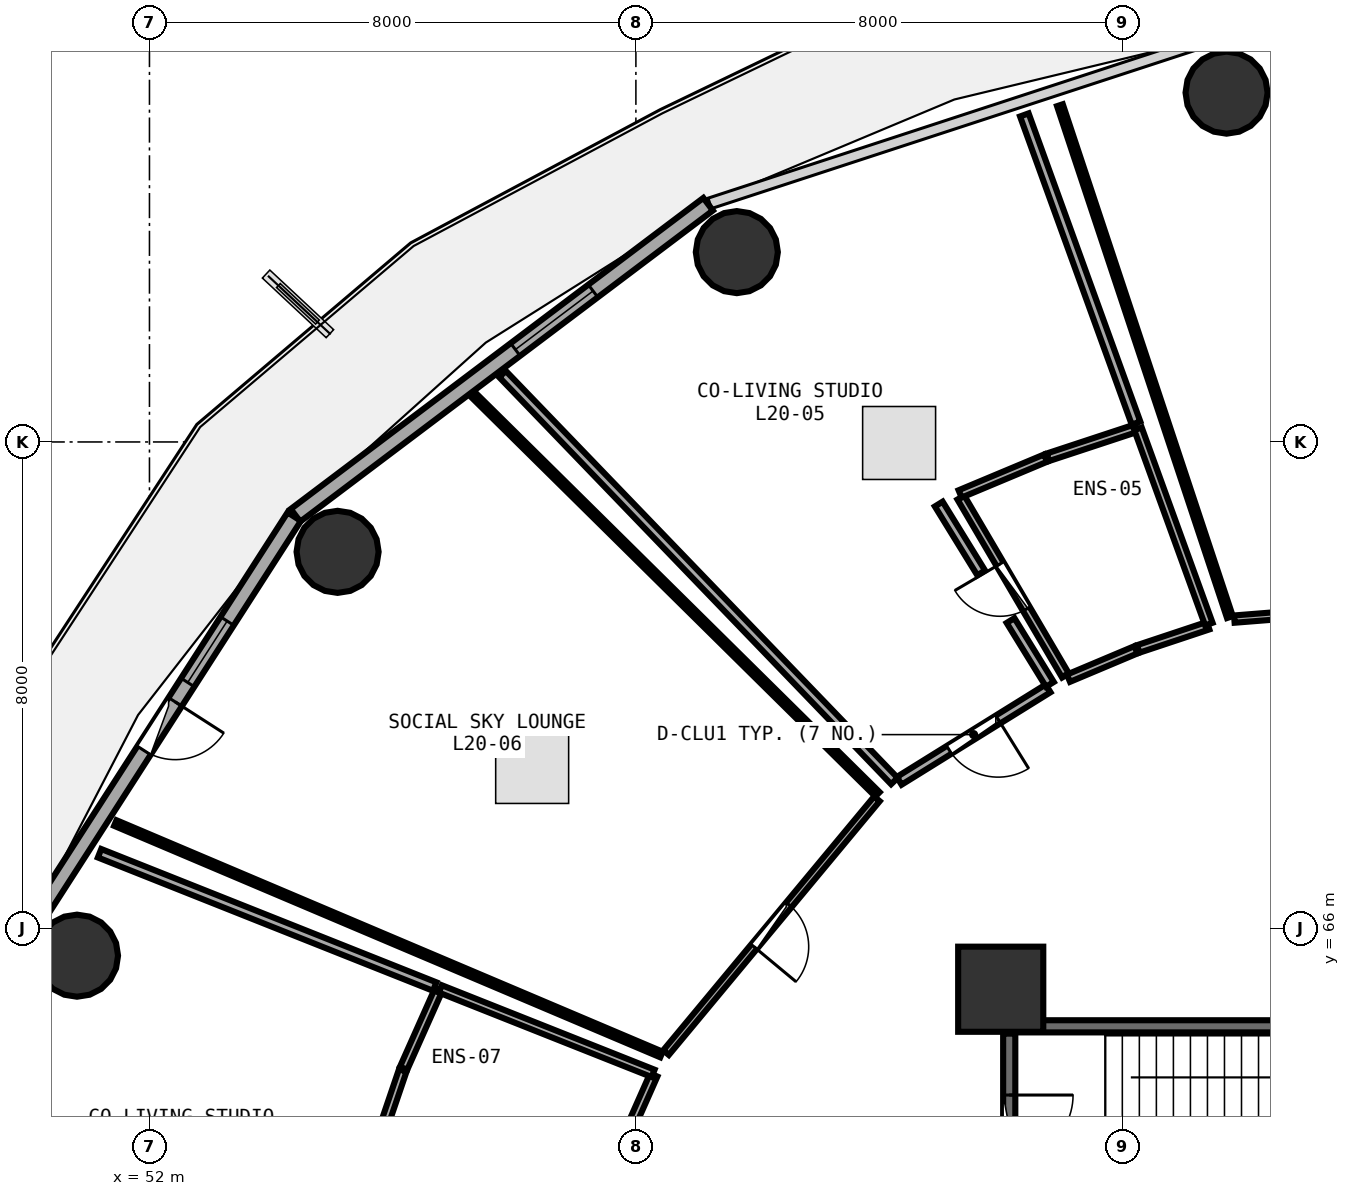
"""IFC4 building model, lengths in metres.
Left out: names, types, materials, properties, quantities, classifications, styles, units other than length and angle.
Written with IfcOpenShell. Run it as: python <this file> out.ifc"""

import sys

from ifc_helpers import new_model, si_unit, direction, frame, frame_2d, origin, origin_2d, place, context, subcontext, project, spatial, rectangle, circle, extrude, element, fill, save


model = new_model("IFC4")
c1 = context("Model", 3, precision=1e-05, world=origin(), true_north=direction((0.0, 1.0)))
c2 = subcontext(c1, "Body", "Model", "MODEL_VIEW")
j1 = project(units=[si_unit("LENGTHUNIT", "METRE"), si_unit("PLANEANGLEUNIT", "RADIAN")], contexts=[c1])
p1 = place(None, origin())
s1 = spatial("IfcSite", under=j1, at=p1, CompositionType="ELEMENT")
p2 = place(p1, origin())
s2 = spatial("IfcBuilding", under=s1, at=p2, CompositionType="ELEMENT")
p3 = place(p2, frame((0.0, 0.0, 80.1)))
s3 = spatial("IfcBuildingStorey", under=s2, at=p3, CompositionType="ELEMENT", Elevation=80.1)
p4 = place(p3, frame((66.0, 65.0, 0.0), z_axis=(0.0, 0.0, 1.0), x_axis=(1.0, 0.0, 0.0)))
e1 = element("IfcColumn", 1, at=p4, inside=s3, PredefinedType="PILASTER", context=c2, shape_type="SweptSolid", body=[
    extrude(rectangle(XDim=1.4, YDim=1.4, at=origin_2d()), origin(), (0.0, 0.0, 1.0), 3.75),
])
for number, where, z_axis, x_axis in (
    (2, (69.714, 79.745, 0.0), (0.0, 0.0, 1.0), (1.0, 0.0, 0.0)),
    (3, (61.66, 77.122, 0.0), (0.0, 0.0, 1.0), (1.0, 0.0, 0.0)),
    (4, (55.094, 72.193, 0.0), (0.0, 0.0, 1.0), (1.0, 0.0, 0.0)),
    (5, (50.808, 65.552, 0.0), (0.0, 0.0, 1.0), (1.0, 0.0, 0.0)),
):
    element("IfcColumn", number, at=place(p3, frame(where, z_axis=z_axis, x_axis=x_axis)), inside=s3, PredefinedType="COLUMN", context=c2, shape_type="SweptSolid", body=[
        extrude(circle(Radius=0.675, at=origin_2d()), origin(), (0.0, 0.0, 1.0), 3.75),
    ])
p5 = place(p3, frame((61.188, 77.91, 0.0), z_axis=(0.0, 0.0, 1.0), x_axis=(-0.798501507879, -0.601992808857, 0.0)))
e6 = element("IfcWall", 6, at=p5, inside=s3, PredefinedType="SOLIDWALL", context=c2, shape_type="SweptSolid", body=[
    extrude(rectangle(XDim=8.499, YDim=0.26, at=frame_2d((4.25, 0.0))), origin(), (0.0, 0.0, 1.0), 3.475),
])
p6 = place(p5, frame((2.37, 0.0, 0.85)))
e7 = element("IfcOpeningElement", 7, at=p6, cuts=e6, PredefinedType="OPENING", context=c2, shape_type="SweptSolid", body=[
    extrude(rectangle(XDim=1.6, YDim=1.45, at=frame_2d((0.8, 0.725))), frame((0.0, 0.14, 0.0), z_axis=(0.0, -1.0, 0.0), x_axis=(1.0, 0.0, 0.0)), (0.0, 0.0, 1.0), 0.28),
])
p7 = place(p3, frame((54.381, 72.771, 0.0), z_axis=(0.0, 0.0, 1.0), x_axis=(-0.540620528459, -0.841266571432, 0.0)))
e8 = element("IfcWall", 8, at=p7, inside=s3, PredefinedType="SOLIDWALL", context=c2, shape_type="SweptSolid", body=[
    extrude(rectangle(XDim=8.193, YDim=0.26, at=frame_2d((4.096, 0.0))), origin(), (0.0, 0.0, 1.0), 3.475),
])
p8 = place(p7, frame((3.621, 0.0, 0.0)))
e9 = element("IfcOpeningElement", 9, at=p8, cuts=e8, PredefinedType="OPENING", context=c2, shape_type="SweptSolid", body=[
    extrude(rectangle(XDim=0.95, YDim=2.1, at=frame_2d((0.475, 1.05))), frame((0.0, 0.14, 0.0), z_axis=(0.0, -1.0, 0.0), x_axis=(1.0, 0.0, 0.0)), (0.0, 0.0, 1.0), 0.28),
])
p9 = place(p7, frame((2.041, 0.0, 0.85)))
e10 = element("IfcOpeningElement", 10, at=p9, cuts=e8, PredefinedType="OPENING", context=c2, shape_type="SweptSolid", body=[
    extrude(rectangle(XDim=1.2, YDim=1.45, at=frame_2d((0.6, 0.725))), frame((0.0, 0.14, 0.0), z_axis=(0.0, -1.0, 0.0), x_axis=(1.0, 0.0, 0.0)), (0.0, 0.0, 1.0), 0.28),
])
p10 = place(p3, frame((73.42, 64.39, 0.0), z_axis=(0.0, 0.0, 1.0), x_axis=(-1.0, 0.0, 0.0)))
e11 = element("IfcWall", 11, at=p10, inside=s3, PredefinedType="SHEAR", context=c2, shape_type="SweptSolid", body=[
    extrude(rectangle(XDim=7.16, YDim=0.2, at=frame_2d((3.58, 0.0))), origin(), (0.0, 0.0, 1.0), 3.49),
])
p11 = place(p3, frame((66.14, 64.27, 0.0), z_axis=(0.0, 0.0, 1.0), x_axis=(0.0, -1.0, 0.0)))
e12 = element("IfcWall", 12, at=p11, inside=s3, PredefinedType="SHEAR", context=c2, shape_type="SweptSolid", body=[
    extrude(rectangle(XDim=3.07, YDim=0.2, at=frame_2d((1.535, 0.0))), origin(), (0.0, 0.0, 1.0), 3.49),
])
p12 = place(p11, frame((1.01, 0.0, 0.0)))
e13 = element("IfcOpeningElement", 13, at=p12, cuts=e12, PredefinedType="OPENING", context=c2, shape_type="SweptSolid", body=[
    extrude(rectangle(XDim=1.05, YDim=2.1, at=frame_2d((0.525, 1.05))), frame((0.0, 0.11, 0.0), z_axis=(0.0, -1.0, 0.0), x_axis=(1.0, 0.0, 0.0)), (0.0, 0.0, 1.0), 0.22),
])
p13 = place(p3, frame((75.589, 71.543, 0.0), z_axis=(0.0, 0.0, 1.0), x_axis=(-0.996863165686, -0.079144354814, 0.0)))
e14 = element("IfcWall", 14, at=p13, inside=s3, PredefinedType="PARTITIONING", context=c2, shape_type="SweptSolid", body=[
    extrude(rectangle(XDim=5.765, YDim=0.12, at=frame_2d((2.883, 0.0))), origin(), (0.0, 0.0, 1.0), 2.925),
])
p14 = place(p13, frame((2.433, 0.0, 0.0)))
e15 = element("IfcOpeningElement", 15, at=p14, cuts=e14, PredefinedType="OPENING", context=c2, shape_type="SweptSolid", body=[
    extrude(rectangle(XDim=0.9, YDim=2.08, at=frame_2d((0.45, 1.04))), frame((0.0, 0.07, 0.0), z_axis=(0.0, -1.0, 0.0), x_axis=(1.0, 0.0, 0.0)), (0.0, 0.0, 1.0), 0.14),
])
p15 = place(p3, frame((67.066, 70.159, 0.0), z_axis=(0.0, 0.0, 1.0), x_axis=(-0.506831608452, 0.862045080419, 0.0)))
e16 = element("IfcWall", 16, at=p15, inside=s3, PredefinedType="PLUMBINGWALL", context=c2, shape_type="SweptSolid", body=[
    extrude(rectangle(XDim=3.396, YDim=0.13, at=frame_2d((1.698, 0.0))), origin(), (0.0, 0.0, 1.0), 3.175),
])
p16 = place(p15, frame((1.268, 0.0, 0.0)))
e17 = element("IfcOpeningElement", 17, at=p16, cuts=e16, PredefinedType="OPENING", context=c2, shape_type="SweptSolid", body=[
    extrude(rectangle(XDim=0.86, YDim=2.05, at=frame_2d((0.43, 1.025))), frame((0.0, 0.075, 0.0), z_axis=(0.0, -1.0, 0.0), x_axis=(1.0, 0.0, 0.0)), (0.0, 0.0, 1.0), 0.15),
])
p17 = place(p3, frame((66.779, 69.947, 0.0), z_axis=(0.0, 0.0, 1.0), x_axis=(-0.849569495091, -0.527476703761, 0.0)))
e18 = element("IfcWall", 18, at=p17, inside=s3, PredefinedType="PARTITIONING", context=c2, shape_type="SweptSolid", body=[
    extrude(rectangle(XDim=2.883, YDim=0.15, at=frame_2d((1.441, 0.0))), origin(), (0.0, 0.0, 1.0), 2.925),
])
p18 = place(p17, frame((0.966, 0.0, 0.0)))
e19 = element("IfcOpeningElement", 19, at=p18, cuts=e18, PredefinedType="OPENING", context=c2, shape_type="SweptSolid", body=[
    extrude(rectangle(XDim=0.95, YDim=2.08, at=frame_2d((0.475, 1.04))), frame((0.0, 0.085, 0.0), z_axis=(0.0, -1.0, 0.0), x_axis=(1.0, 0.0, 0.0)), (0.0, 0.0, 1.0), 0.17),
])
p19 = place(p3, frame((63.964, 68.131, 0.0), z_axis=(0.0, 0.0, 1.0), x_axis=(-0.639104047727, -0.769120287198, 0.0)))
e20 = element("IfcWall", 20, at=p19, inside=s3, PredefinedType="PARTITIONING", context=c2, shape_type="SweptSolid", body=[
    extrude(rectangle(XDim=5.427, YDim=0.12, at=frame_2d((2.713, 0.0))), origin(), (0.0, 0.0, 1.0), 2.925),
])
p20 = place(p19, frame((2.263, 0.0, 0.0)))
e21 = element("IfcOpeningElement", 21, at=p20, cuts=e20, PredefinedType="OPENING", context=c2, shape_type="SweptSolid", body=[
    extrude(rectangle(XDim=0.9, YDim=2.08, at=frame_2d((0.45, 1.04))), frame((0.0, 0.07, 0.0), z_axis=(0.0, -1.0, 0.0), x_axis=(1.0, 0.0, 0.0)), (0.0, 0.0, 1.0), 0.14),
])
p21 = place(p3, frame((69.769, 71.12, 0.0), z_axis=(0.0, 0.0, 1.0), x_axis=(-0.315178903164, 0.949032275005, 0.0)))
e22 = element("IfcWall", 22, at=p21, inside=s3, PredefinedType="PARTITIONING", context=c2, shape_type="SweptSolid", body=[
    extrude(rectangle(XDim=8.87, YDim=0.1, at=frame_2d((4.435, 0.0))), origin(), (0.0, 0.0, 1.0), 2.975),
])
p22 = place(p3, frame((69.411, 70.979, 0.0), z_axis=(0.0, 0.0, 1.0), x_axis=(-0.948784055635, -0.315925332592, 0.0)))
e23 = element("IfcWall", 23, at=p22, inside=s3, PredefinedType="PLUMBINGWALL", context=c2, shape_type="SweptSolid", body=[
    extrude(rectangle(XDim=1.211, YDim=0.13, at=frame_2d((0.605, 0.0))), origin(), (0.0, 0.0, 1.0), 3.48),
])
p23 = place(p3, frame((68.225, 70.582, 0.0), z_axis=(0.0, 0.0, 1.0), x_axis=(-0.921601034592, -0.388138548767, 0.0)))
e24 = element("IfcWall", 24, at=p23, inside=s3, PredefinedType="PLUMBINGWALL", context=c2, shape_type="SweptSolid", body=[
    extrude(rectangle(XDim=1.205, YDim=0.13, at=frame_2d((0.602, 0.0))), origin(), (0.0, 0.0, 1.0), 3.235),
])
p24 = place(p3, frame((65.333, 73.146, 0.0), z_axis=(0.0, 0.0, 1.0), x_axis=(0.922426393113, 0.38617295256, 0.0)))
e25 = element("IfcWall", 25, at=p24, inside=s3, PredefinedType="PLUMBINGWALL", context=c2, shape_type="SweptSolid", body=[
    extrude(rectangle(XDim=1.524, YDim=0.13, at=frame_2d((0.762, 0.0))), origin(), (0.0, 0.0, 1.0), 3.48),
])
p25 = place(p3, frame((66.776, 73.748, 0.0), z_axis=(0.0, 0.0, 1.0), x_axis=(0.949634335139, 0.313360223265, 0.0)))
e26 = element("IfcWall", 26, at=p25, inside=s3, PredefinedType="PLUMBINGWALL", context=c2, shape_type="SweptSolid", body=[
    extrude(rectangle(XDim=1.533, YDim=0.13, at=frame_2d((0.767, 0.0))), origin(), (0.0, 0.0, 1.0), 3.48),
])
p26 = place(p3, frame((68.258, 74.216, 0.0), z_axis=(0.0, 0.0, 1.0), x_axis=(0.341002962554, -0.940062221095, 0.0)))
e27 = element("IfcWall", 27, at=p26, inside=s3, PredefinedType="PLUMBINGWALL", context=c2, shape_type="SweptSolid", body=[
    extrude(rectangle(XDim=3.417, YDim=0.13, at=frame_2d((1.708, 0.0))), origin(), (0.0, 0.0, 1.0), 3.175),
])
p27 = place(p3, frame((64.251, 68.424, 0.0), z_axis=(0.0, 0.0, 1.0), x_axis=(-0.693645221886, 0.720316809574, 0.0)))
e28 = element("IfcWall", 28, at=p27, inside=s3, PredefinedType="PARTITIONING", context=c2, shape_type="SweptSolid", body=[
    extrude(rectangle(XDim=9.291, YDim=0.15, at=frame_2d((4.646, 0.0))), origin(), (0.0, 0.0, 1.0), 2.975),
])
p28 = place(p3, frame((66.389, 79.378, 0.0), z_axis=(0.0, 0.0, 1.0), x_axis=(0.340728267281, -0.940161820048, 0.0)))
e29 = element("IfcWall", 29, at=p28, inside=s3, PredefinedType="PARTITIONING", context=c2, shape_type="SweptSolid", body=[
    extrude(rectangle(XDim=5.39, YDim=0.15, at=frame_2d((2.695, 0.0))), origin(), (0.0, 0.0, 1.0), 2.975),
])
p29 = place(p3, frame((64.981, 72.979, 0.0), z_axis=(0.0, 0.0, 1.0), x_axis=(0.524609403226, -0.851343041345, 0.0)))
e30 = element("IfcWall", 30, at=p29, inside=s3, PredefinedType="PARTITIONING", context=c2, shape_type="SweptSolid", body=[
    extrude(rectangle(XDim=1.33, YDim=0.15, at=frame_2d((0.665, 0.0))), origin(), (0.0, 0.0, 1.0), 3.175),
])
p30 = place(p3, frame((66.162, 71.063, 0.0), z_axis=(0.0, 0.0, 1.0), x_axis=(0.52475967521, -0.851250423362, 0.0)))
e31 = element("IfcWall", 31, at=p30, inside=s3, PredefinedType="PARTITIONING", context=c2, shape_type="SweptSolid", body=[
    extrude(rectangle(XDim=1.234, YDim=0.15, at=frame_2d((0.617, 0.0))), origin(), (0.0, 0.0, 1.0), 3.235),
])
p31 = place(p3, frame((60.42, 63.927, 0.0), z_axis=(0.0, 0.0, 1.0), x_axis=(-0.920723225206, 0.390216276654, 0.0)))
e32 = element("IfcWall", 32, at=p31, inside=s3, PredefinedType="PARTITIONING", context=c2, shape_type="SweptSolid", body=[
    extrude(rectangle(XDim=9.756, YDim=0.1, at=frame_2d((4.878, 0.0))), origin(), (0.0, 0.0, 1.0), 2.925),
])
p32 = place(p3, frame((57.344, 74.756, 0.0), z_axis=(0.0, 0.0, 1.0), x_axis=(0.711285789258, -0.702902927864, 0.0)))
e33 = element("IfcWall", 33, at=p32, inside=s3, PredefinedType="PARTITIONING", context=c2, shape_type="SweptSolid", body=[
    extrude(rectangle(XDim=9.32, YDim=0.1, at=frame_2d((4.66, 0.0))), origin(), (0.0, 0.0, 1.0), 2.975),
])
p33 = place(p3, frame((60.294, 63.591, 0.0), z_axis=(0.0, 0.0, 1.0), x_axis=(-0.40547338745, -0.914106849372, 0.0)))
e34 = element("IfcWall", 34, at=p33, inside=s3, PredefinedType="PLUMBINGWALL", context=c2, shape_type="SweptSolid", body=[
    extrude(rectangle(XDim=1.124, YDim=0.13, at=frame_2d((0.562, 0.0))), origin(), (0.0, 0.0, 1.0), 3.235),
])
p34 = place(p3, frame((55.711, 62.331, 0.0), z_axis=(0.0, 0.0, 1.0), x_axis=(0.322409215332, 0.946600389747, 0.0)))
e35 = element("IfcWall", 35, at=p34, inside=s3, PredefinedType="PLUMBINGWALL", context=c2, shape_type="SweptSolid", body=[
    extrude(rectangle(XDim=1.408, YDim=0.13, at=frame_2d((0.704, 0.0))), origin(), (0.0, 0.0, 1.0), 3.48),
])
p35 = place(p3, frame((56.18, 63.701, 0.0), z_axis=(0.0, 0.0, 1.0), x_axis=(0.407258007738, 0.913313152831, 0.0)))
e36 = element("IfcWall", 36, at=p35, inside=s3, PredefinedType="PLUMBINGWALL", context=c2, shape_type="SweptSolid", body=[
    extrude(rectangle(XDim=1.416, YDim=0.13, at=frame_2d((0.708, 0.0))), origin(), (0.0, 0.0, 1.0), 3.175),
])
p36 = place(p3, frame((56.784, 65.006, 0.0), z_axis=(0.0, 0.0, 1.0), x_axis=(0.929457187308, -0.368929989242, 0.0)))
e37 = element("IfcWall", 37, at=p36, inside=s3, PredefinedType="PLUMBINGWALL", context=c2, shape_type="SweptSolid", body=[
    extrude(rectangle(XDim=3.765, YDim=0.13, at=frame_2d((1.883, 0.0))), origin(), (0.0, 0.0, 1.0), 3.175),
])
p37 = place(p3, frame((51.179, 67.236, 0.0), z_axis=(0.0, 0.0, 1.0), x_axis=(0.929212756669, -0.369545197294, 0.0)))
e38 = element("IfcWall", 38, at=p37, inside=s3, PredefinedType="PARTITIONING", context=c2, shape_type="SweptSolid", body=[
    extrude(rectangle(XDim=5.933, YDim=0.15, at=frame_2d((2.966, 0.0))), origin(), (0.0, 0.0, 1.0), 2.925),
])
p38 = place(p6, origin())
e39 = element("IfcWindow", 39, at=p38, inside=s3, PartitioningType="SINGLE_PANEL", PredefinedType="WINDOW", context=c2, shape_type="SweptSolid", body=[
    extrude(rectangle(XDim=1.6, YDim=1.45, at=frame_2d((0.8, 0.725))), frame((0.0, 0.03, 0.0), z_axis=(0.0, -1.0, 0.0), x_axis=(1.0, 0.0, 0.0)), (0.0, 0.0, 1.0), 0.06),
])
fill(e7, e39)
p39 = place(p8, frame((0.95, 0.0, 0.0), z_axis=(0.0, 0.0, 1.0), x_axis=(-1.0, 0.0, 0.0)))
e40 = element("IfcDoor", 40, at=p39, inside=s3, OperationType="SINGLE_SWING_RIGHT", PredefinedType="DOOR", context=c2, shape_type="SweptSolid", body=[
    extrude(rectangle(XDim=0.95, YDim=2.1, at=frame_2d((0.475, 1.05))), frame((0.0, 0.025, 0.0), z_axis=(0.0, -1.0, 0.0), x_axis=(1.0, 0.0, 0.0)), (0.0, 0.0, 1.0), 0.05),
])
fill(e9, e40)
p40 = place(p9, origin())
e41 = element("IfcWindow", 41, at=p40, inside=s3, PartitioningType="SINGLE_PANEL", PredefinedType="WINDOW", context=c2, shape_type="SweptSolid", body=[
    extrude(rectangle(XDim=1.2, YDim=1.45, at=frame_2d((0.6, 0.725))), frame((0.0, 0.03, 0.0), z_axis=(0.0, -1.0, 0.0), x_axis=(1.0, 0.0, 0.0)), (0.0, 0.0, 1.0), 0.06),
])
fill(e10, e41)
p41 = place(p12, origin())
e42 = element("IfcDoor", 42, at=p41, inside=s3, OperationType="SINGLE_SWING_LEFT", PredefinedType="DOOR", context=c2, shape_type="SweptSolid", body=[
    extrude(rectangle(XDim=1.05, YDim=2.1, at=frame_2d((0.525, 1.05))), frame((0.0, 0.025, 0.0), z_axis=(0.0, -1.0, 0.0), x_axis=(1.0, 0.0, 0.0)), (0.0, 0.0, 1.0), 0.05),
])
fill(e13, e42)
p42 = place(p16, origin())
e43 = element("IfcDoor", 43, at=p42, inside=s3, OperationType="SINGLE_SWING_RIGHT", PredefinedType="DOOR", context=c2, shape_type="SweptSolid", body=[
    extrude(rectangle(XDim=0.86, YDim=2.05, at=frame_2d((0.43, 1.025))), frame((0.0, 0.025, 0.0), z_axis=(0.0, -1.0, 0.0), x_axis=(1.0, 0.0, 0.0)), (0.0, 0.0, 1.0), 0.05),
])
fill(e17, e43)
p43 = place(p18, origin())
e44 = element("IfcDoor", 44, at=p43, inside=s3, OperationType="SINGLE_SWING_LEFT", PredefinedType="DOOR", context=c2, shape_type="SweptSolid", body=[
    extrude(rectangle(XDim=0.95, YDim=2.08, at=frame_2d((0.475, 1.04))), frame((0.0, 0.025, 0.0), z_axis=(0.0, -1.0, 0.0), x_axis=(1.0, 0.0, 0.0)), (0.0, 0.0, 1.0), 0.05),
])
fill(e19, e44)
p44 = place(p20, origin())
e45 = element("IfcDoor", 45, at=p44, inside=s3, OperationType="SINGLE_SWING_RIGHT", PredefinedType="DOOR", context=c2, shape_type="SweptSolid", body=[
    extrude(rectangle(XDim=0.9, YDim=2.08, at=frame_2d((0.45, 1.04))), frame((0.0, 0.025, 0.0), z_axis=(0.0, -1.0, 0.0), x_axis=(1.0, 0.0, 0.0)), (0.0, 0.0, 1.0), 0.05),
])
fill(e21, e45)
save(model, sys.argv[1])
